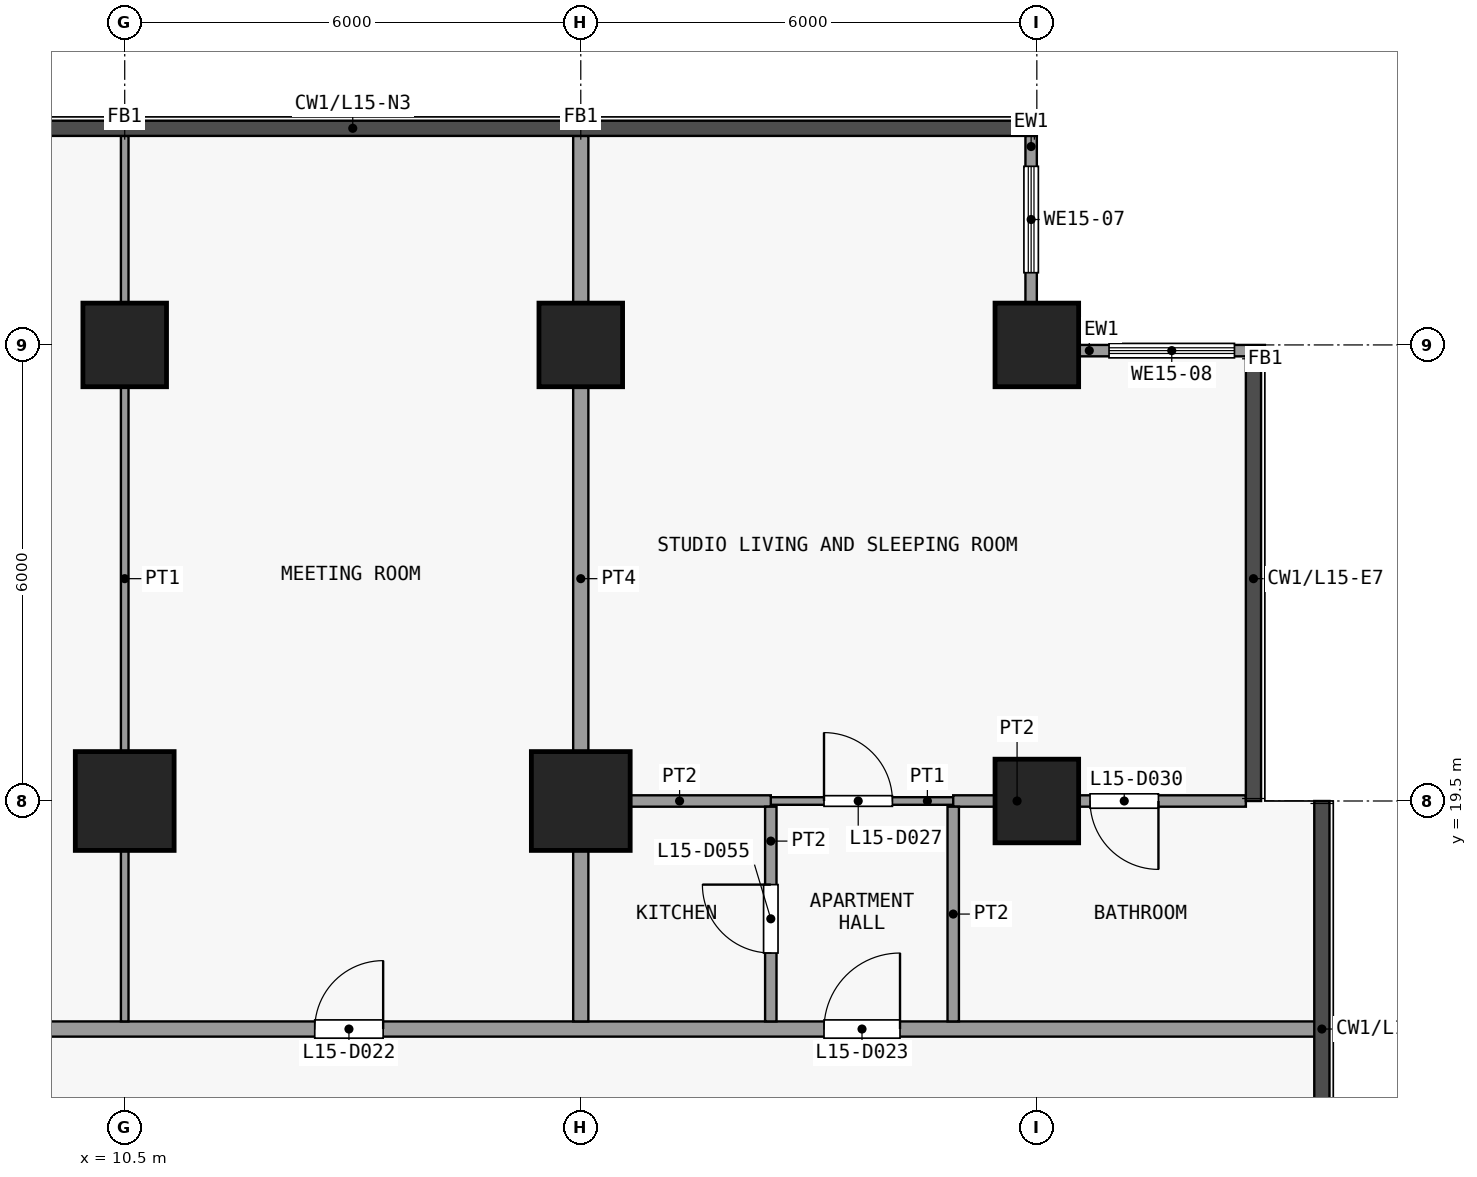
"""IFC4 building model, lengths in metres.
Left out: names, types, materials, properties, quantities, classifications, styles, units other than length and angle.
Written with IfcOpenShell. Run it as: python <this file> out.ifc"""

import sys

from ifc_helpers import new_model, si_unit, direction, frame, frame_2d, origin, origin_2d, place, context, subcontext, project, spatial, rectangle, extrude, element, fill, save


model = new_model("IFC4")
c1 = context("Model", 3, precision=1e-05, world=origin(), true_north=direction((0.0, 1.0)))
c2 = subcontext(c1, "Body", "Model", "MODEL_VIEW")
j1 = project(units=[si_unit("LENGTHUNIT", "METRE"), si_unit("PLANEANGLEUNIT", "RADIAN")], contexts=[c1])
p1 = place(None, origin())
s1 = spatial("IfcSite", under=j1, at=p1, CompositionType="ELEMENT")
p2 = place(p1, origin())
s2 = spatial("IfcBuilding", under=s1, at=p2, CompositionType="ELEMENT")
p3 = place(p2, frame((0.0, 0.0, 64.9)))
s3 = spatial("IfcBuildingStorey", under=s2, at=p3, CompositionType="ELEMENT", Elevation=64.9)
p4 = place(p3, frame((10.5, 19.5, 0.0), z_axis=(0.0, 0.0, 1.0), x_axis=(1.0, 0.0, 0.0)))
e1 = element("IfcColumn", 1, at=p4, inside=s3, PredefinedType="COLUMN", context=c2, shape_type="SweptSolid", body=[
    extrude(rectangle(XDim=1.3, YDim=1.3, at=origin_2d()), origin(), (0.0, 0.0, 1.0), 3.6),
])
p5 = place(p3, frame((10.5, 25.5, 0.0), z_axis=(0.0, 0.0, 1.0), x_axis=(1.0, 0.0, 0.0)))
e2 = element("IfcColumn", 2, at=p5, inside=s3, PredefinedType="COLUMN", context=c2, shape_type="SweptSolid", body=[
    extrude(rectangle(XDim=1.1, YDim=1.1, at=origin_2d()), origin(), (0.0, 0.0, 1.0), 3.6),
])
p6 = place(p3, frame((16.5, 19.5, 0.0), z_axis=(0.0, 0.0, 1.0), x_axis=(1.0, 0.0, 0.0)))
e3 = element("IfcColumn", 3, at=p6, inside=s3, PredefinedType="COLUMN", context=c2, shape_type="SweptSolid", body=[
    extrude(rectangle(XDim=1.3, YDim=1.3, at=origin_2d()), origin(), (0.0, 0.0, 1.0), 3.6),
])
for number, where, z_axis, x_axis in (
    (4, (16.5, 25.5, 0.0), (0.0, 0.0, 1.0), (1.0, 0.0, 0.0)),
    (5, (22.5, 19.5, 0.0), (0.0, 0.0, 1.0), (1.0, 0.0, 0.0)),
    (6, (22.5, 25.5, 0.0), (0.0, 0.0, 1.0), (1.0, 0.0, 0.0)),
):
    element("IfcColumn", number, at=place(p3, frame(where, z_axis=z_axis, x_axis=x_axis)), inside=s3, PredefinedType="COLUMN", context=c2, shape_type="SweptSolid", body=[
        extrude(rectangle(XDim=1.1, YDim=1.1, at=origin_2d()), origin(), (0.0, 0.0, 1.0), 3.6),
    ])
p7 = place(p3, frame((22.425, 28.25, 0.0), z_axis=(0.0, 0.0, 1.0), x_axis=(0.0, -1.0, 0.0)))
e7 = element("IfcWall", 7, at=p7, inside=s3, PredefinedType="SOLIDWALL", context=c2, shape_type="SweptSolid", body=[
    extrude(rectangle(XDim=2.2, YDim=0.15, at=frame_2d((1.1, 0.0))), origin(), (0.0, 0.0, 1.0), 3.3),
])
p8 = place(p7, frame((0.4, 0.0, 0.9)))
e8 = element("IfcOpeningElement", 8, at=p8, cuts=e7, PredefinedType="OPENING", context=c2, shape_type="SweptSolid", body=[
    extrude(rectangle(XDim=1.4, YDim=2.4, at=frame_2d((0.7, 1.2))), frame((0.0, 0.085, 0.0), z_axis=(0.0, -1.0, 0.0), x_axis=(1.0, 0.0, 0.0)), (0.0, 0.0, 1.0), 0.17),
])
p9 = place(p3, frame((23.05, 25.425, 0.0), z_axis=(0.0, 0.0, 1.0), x_axis=(1.0, 0.0, 0.0)))
e9 = element("IfcWall", 9, at=p9, inside=s3, PredefinedType="SOLIDWALL", context=c2, shape_type="SweptSolid", body=[
    extrude(rectangle(XDim=2.45, YDim=0.15, at=frame_2d((1.225, 0.0))), origin(), (0.0, 0.0, 1.0), 3.3),
])
p10 = place(p9, frame((0.4, 0.0, 0.9)))
e10 = element("IfcOpeningElement", 10, at=p10, cuts=e9, PredefinedType="OPENING", context=c2, shape_type="SweptSolid", body=[
    extrude(rectangle(XDim=1.65, YDim=2.4, at=frame_2d((0.825, 1.2))), frame((0.0, 0.085, 0.0), z_axis=(0.0, -1.0, 0.0), x_axis=(1.0, 0.0, 0.0)), (0.0, 0.0, 1.0), 0.17),
])
p11 = place(p3, frame((-25.35, 16.5, 0.0), z_axis=(0.0, 0.0, 1.0), x_axis=(1.0, 0.0, 0.0)))
e11 = element("IfcWall", 11, at=p11, inside=s3, PredefinedType="PARTITIONING", context=c2, shape_type="SweptSolid", body=[
    extrude(rectangle(XDim=51.6, YDim=0.2, at=frame_2d((25.8, 0.0))), origin(), (0.0, 0.0, 1.0), 3.3),
])
p12 = place(p11, frame((4.55, 0.0, 0.0)))
e12 = element("IfcOpeningElement", 12, at=p12, cuts=e11, PredefinedType="OPENING", context=c2, shape_type="SweptSolid", body=[
    extrude(rectangle(XDim=1.0, YDim=2.1, at=frame_2d((0.5, 1.05))), frame((0.0, 0.11, 0.0), z_axis=(0.0, -1.0, 0.0), x_axis=(1.0, 0.0, 0.0)), (0.0, 0.0, 1.0), 0.22),
])
p13 = place(p11, frame((13.05, 0.0, 0.0)))
e13 = element("IfcOpeningElement", 13, at=p13, cuts=e11, PredefinedType="OPENING", context=c2, shape_type="SweptSolid", body=[
    extrude(rectangle(XDim=1.0, YDim=2.1, at=frame_2d((0.5, 1.05))), frame((0.0, 0.11, 0.0), z_axis=(0.0, -1.0, 0.0), x_axis=(1.0, 0.0, 0.0)), (0.0, 0.0, 1.0), 0.22),
])
p14 = place(p11, frame((24.05, 0.0, 0.0)))
e14 = element("IfcOpeningElement", 14, at=p14, cuts=e11, PredefinedType="OPENING", context=c2, shape_type="SweptSolid", body=[
    extrude(rectangle(XDim=1.0, YDim=2.1, at=frame_2d((0.5, 1.05))), frame((0.0, 0.11, 0.0), z_axis=(0.0, -1.0, 0.0), x_axis=(1.0, 0.0, 0.0)), (0.0, 0.0, 1.0), 0.22),
])
p15 = place(p11, frame((32.35, 0.0, 0.0)))
e15 = element("IfcOpeningElement", 15, at=p15, cuts=e11, PredefinedType="OPENING", context=c2, shape_type="SweptSolid", body=[
    extrude(rectangle(XDim=0.9, YDim=2.1, at=frame_2d((0.45, 1.05))), frame((0.0, 0.11, 0.0), z_axis=(0.0, -1.0, 0.0), x_axis=(1.0, 0.0, 0.0)), (0.0, 0.0, 1.0), 0.22),
])
p16 = place(p11, frame((38.35, 0.0, 0.0)))
e16 = element("IfcOpeningElement", 16, at=p16, cuts=e11, PredefinedType="OPENING", context=c2, shape_type="SweptSolid", body=[
    extrude(rectangle(XDim=0.9, YDim=2.1, at=frame_2d((0.45, 1.05))), frame((0.0, 0.11, 0.0), z_axis=(0.0, -1.0, 0.0), x_axis=(1.0, 0.0, 0.0)), (0.0, 0.0, 1.0), 0.22),
])
p17 = place(p11, frame((45.05, 0.0, 0.0)))
e17 = element("IfcOpeningElement", 17, at=p17, cuts=e11, PredefinedType="OPENING", context=c2, shape_type="SweptSolid", body=[
    extrude(rectangle(XDim=1.0, YDim=2.1, at=frame_2d((0.5, 1.05))), frame((0.0, 0.11, 0.0), z_axis=(0.0, -1.0, 0.0), x_axis=(1.0, 0.0, 0.0)), (0.0, 0.0, 1.0), 0.22),
])
p18 = place(p3, frame((19.0, 19.5, 0.0), z_axis=(0.0, 0.0, 1.0), x_axis=(1.0, 0.0, 0.0)))
e18 = element("IfcWall", 18, at=p18, inside=s3, PredefinedType="PARTITIONING", context=c2, shape_type="SweptSolid", body=[
    extrude(rectangle(XDim=2.4, YDim=0.1, at=frame_2d((1.2, 0.0))), origin(), (0.0, 0.0, 1.0), 3.3),
])
p19 = place(p18, frame((0.7, 0.0, 0.0)))
e19 = element("IfcOpeningElement", 19, at=p19, cuts=e18, PredefinedType="OPENING", context=c2, shape_type="SweptSolid", body=[
    extrude(rectangle(XDim=0.9, YDim=2.1, at=frame_2d((0.45, 1.05))), frame((0.0, 0.06, 0.0), z_axis=(0.0, -1.0, 0.0), x_axis=(1.0, 0.0, 0.0)), (0.0, 0.0, 1.0), 0.12),
])
p20 = place(p3, frame((16.6, 19.5, 0.0), z_axis=(0.0, 0.0, 1.0), x_axis=(1.0, 0.0, 0.0)))
e20 = element("IfcWall", 20, at=p20, inside=s3, PredefinedType="PARTITIONING", context=c2, shape_type="SweptSolid", body=[
    extrude(rectangle(XDim=2.4, YDim=0.15, at=frame_2d((1.2, 0.0))), origin(), (0.0, 0.0, 1.0), 3.3),
])
p21 = place(p3, frame((21.4, 19.5, 0.0), z_axis=(0.0, 0.0, 1.0), x_axis=(1.0, 0.0, 0.0)))
e21 = element("IfcWall", 21, at=p21, inside=s3, PredefinedType="PARTITIONING", context=c2, shape_type="SweptSolid", body=[
    extrude(rectangle(XDim=3.85, YDim=0.15, at=frame_2d((1.925, 0.0))), origin(), (0.0, 0.0, 1.0), 3.3),
])
p22 = place(p21, frame((1.8, 0.0, 0.0)))
e22 = element("IfcOpeningElement", 22, at=p22, cuts=e21, PredefinedType="OPENING", context=c2, shape_type="SweptSolid", body=[
    extrude(rectangle(XDim=0.9, YDim=2.1, at=frame_2d((0.45, 1.05))), frame((0.0, 0.085, 0.0), z_axis=(0.0, -1.0, 0.0), x_axis=(1.0, 0.0, 0.0)), (0.0, 0.0, 1.0), 0.17),
])
p23 = place(p3, frame((10.5, 16.6, 0.0), z_axis=(0.0, 0.0, 1.0), x_axis=(0.0, 1.0, 0.0)))
e23 = element("IfcWall", 23, at=p23, inside=s3, PredefinedType="PARTITIONING", context=c2, shape_type="SweptSolid", body=[
    extrude(rectangle(XDim=11.65, YDim=0.1, at=frame_2d((5.825, 0.0))), origin(), (0.0, 0.0, 1.0), 3.3),
])
p24 = place(p3, frame((16.5, 16.6, 0.0), z_axis=(0.0, 0.0, 1.0), x_axis=(0.0, 1.0, 0.0)))
e24 = element("IfcWall", 24, at=p24, inside=s3, PredefinedType="PARTITIONING", context=c2, shape_type="SweptSolid", body=[
    extrude(rectangle(XDim=11.65, YDim=0.2, at=frame_2d((5.825, 0.0))), origin(), (0.0, 0.0, 1.0), 3.3),
])
p25 = place(p3, frame((19.0, 16.6, 0.0), z_axis=(0.0, 0.0, 1.0), x_axis=(0.0, 1.0, 0.0)))
e25 = element("IfcWall", 25, at=p25, inside=s3, PredefinedType="PARTITIONING", context=c2, shape_type="SweptSolid", body=[
    extrude(rectangle(XDim=2.825, YDim=0.15, at=frame_2d((1.413, 0.0))), origin(), (0.0, 0.0, 1.0), 3.3),
])
p26 = place(p25, frame((0.9, 0.0, 0.0)))
e26 = element("IfcOpeningElement", 26, at=p26, cuts=e25, PredefinedType="OPENING", context=c2, shape_type="SweptSolid", body=[
    extrude(rectangle(XDim=0.9, YDim=2.1, at=frame_2d((0.45, 1.05))), frame((0.0, 0.085, 0.0), z_axis=(0.0, -1.0, 0.0), x_axis=(1.0, 0.0, 0.0)), (0.0, 0.0, 1.0), 0.17),
])
p27 = place(p3, frame((21.4, 16.6, 0.0), z_axis=(0.0, 0.0, 1.0), x_axis=(0.0, 1.0, 0.0)))
e27 = element("IfcWall", 27, at=p27, inside=s3, PredefinedType="PARTITIONING", context=c2, shape_type="SweptSolid", body=[
    extrude(rectangle(XDim=2.825, YDim=0.15, at=frame_2d((1.413, 0.0))), origin(), (0.0, 0.0, 1.0), 3.3),
])
p28 = place(p8, origin())
e28 = element("IfcWindow", 28, at=p28, inside=s3, PartitioningType="SINGLE_PANEL", PredefinedType="WINDOW", context=c2, shape_type="SweptSolid", body=[
    extrude(rectangle(XDim=1.4, YDim=2.4, at=frame_2d((0.7, 1.2))), frame((0.0, 0.03, 0.0), z_axis=(0.0, -1.0, 0.0), x_axis=(1.0, 0.0, 0.0)), (0.0, 0.0, 1.0), 0.06),
])
fill(e8, e28)
p29 = place(p10, origin())
e29 = element("IfcWindow", 29, at=p29, inside=s3, PartitioningType="SINGLE_PANEL", PredefinedType="WINDOW", context=c2, shape_type="SweptSolid", body=[
    extrude(rectangle(XDim=1.65, YDim=2.4, at=frame_2d((0.825, 1.2))), frame((0.0, 0.03, 0.0), z_axis=(0.0, -1.0, 0.0), x_axis=(1.0, 0.0, 0.0)), (0.0, 0.0, 1.0), 0.06),
])
fill(e10, e29)
p30 = place(p16, origin())
e30 = element("IfcDoor", 30, at=p30, inside=s3, OperationType="SINGLE_SWING_LEFT", PredefinedType="DOOR", context=c2, shape_type="SweptSolid", body=[
    extrude(rectangle(XDim=0.9, YDim=2.1, at=frame_2d((0.45, 1.05))), frame((0.0, 0.025, 0.0), z_axis=(0.0, -1.0, 0.0), x_axis=(1.0, 0.0, 0.0)), (0.0, 0.0, 1.0), 0.05),
])
fill(e16, e30)
p31 = place(p17, origin())
e31 = element("IfcDoor", 31, at=p31, inside=s3, OperationType="SINGLE_SWING_LEFT", PredefinedType="DOOR", context=c2, shape_type="SweptSolid", body=[
    extrude(rectangle(XDim=1.0, YDim=2.1, at=frame_2d((0.5, 1.05))), frame((0.0, 0.025, 0.0), z_axis=(0.0, -1.0, 0.0), x_axis=(1.0, 0.0, 0.0)), (0.0, 0.0, 1.0), 0.05),
])
fill(e17, e31)
p32 = place(p19, origin())
e32 = element("IfcDoor", 32, at=p32, inside=s3, OperationType="SINGLE_SWING_RIGHT", PredefinedType="DOOR", context=c2, shape_type="SweptSolid", body=[
    extrude(rectangle(XDim=0.9, YDim=2.1, at=frame_2d((0.45, 1.05))), frame((0.0, 0.025, 0.0), z_axis=(0.0, -1.0, 0.0), x_axis=(1.0, 0.0, 0.0)), (0.0, 0.0, 1.0), 0.05),
])
fill(e19, e32)
p33 = place(p22, origin())
e33 = element("IfcDoor", 33, at=p33, inside=s3, OperationType="SINGLE_SWING_RIGHT", PredefinedType="DOOR", context=c2, shape_type="SweptSolid", body=[
    extrude(rectangle(XDim=0.9, YDim=2.1, at=frame_2d((0.45, 1.05))), frame((0.0, 0.025, 0.0), z_axis=(0.0, -1.0, 0.0), x_axis=(1.0, 0.0, 0.0)), (0.0, 0.0, 1.0), 0.05),
])
fill(e22, e33)
p34 = place(p26, origin())
e34 = element("IfcDoor", 34, at=p34, inside=s3, OperationType="SINGLE_SWING_LEFT", PredefinedType="DOOR", context=c2, shape_type="SweptSolid", body=[
    extrude(rectangle(XDim=0.9, YDim=2.1, at=frame_2d((0.45, 1.05))), frame((0.0, 0.025, 0.0), z_axis=(0.0, -1.0, 0.0), x_axis=(1.0, 0.0, 0.0)), (0.0, 0.0, 1.0), 0.05),
])
fill(e26, e34)
save(model, sys.argv[1])
